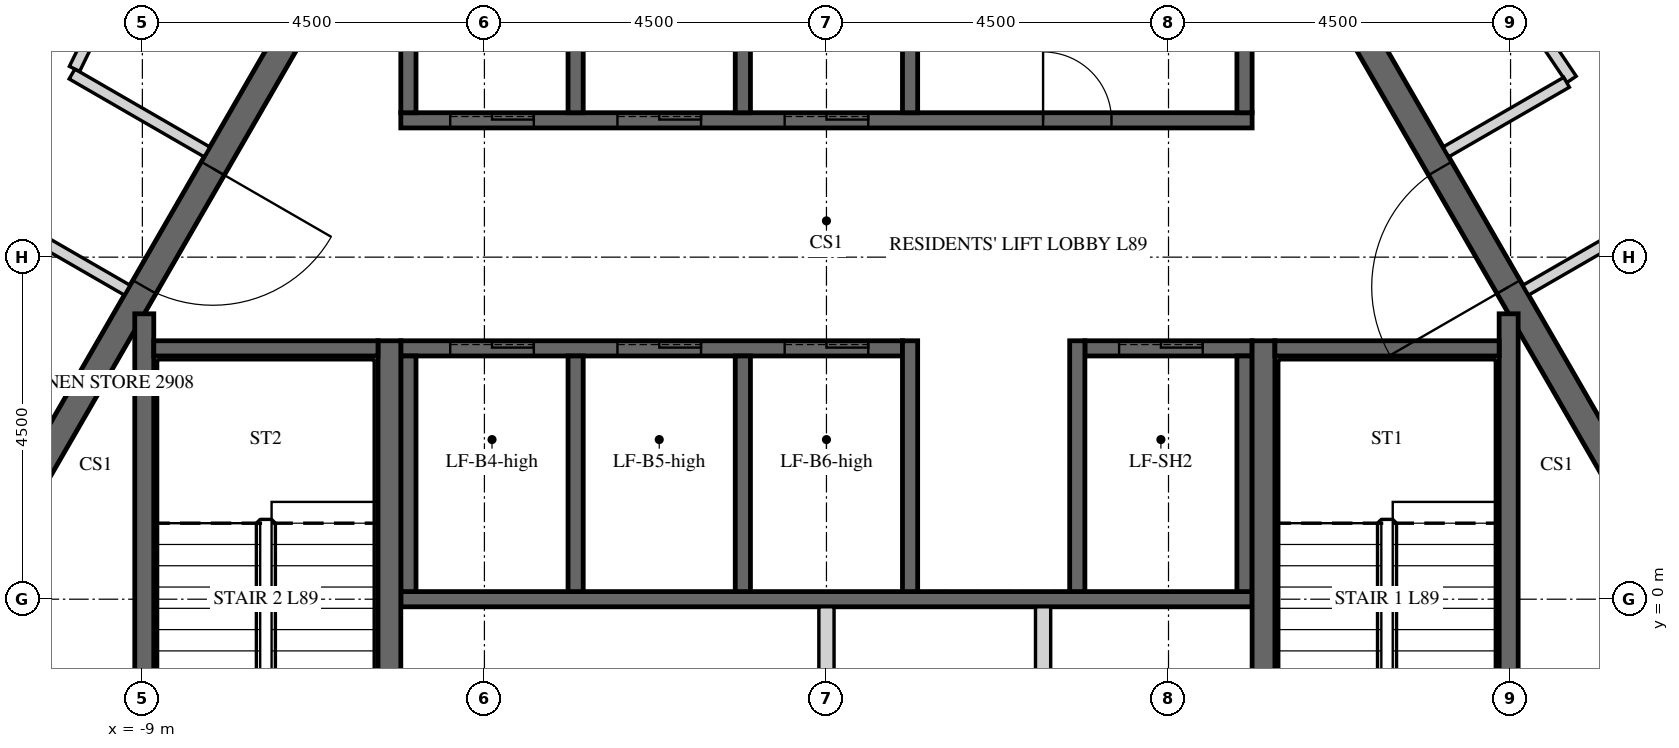
"""IFC4 building model, lengths in metres.
Left out: names, types, materials, properties, quantities, classifications, styles, units other than length and angle.
Written with IfcOpenShell. Run it as: python <this file> out.ifc"""

import sys

from ifc_helpers import new_model, si_unit, direction, frame, frame_2d, origin, place, context, subcontext, project, spatial, polyline, rectangle, outline, extrude, element, fill, save


model = new_model("IFC4")
c1 = context("Model", 3, precision=1e-05, world=origin(), true_north=direction((0.0, 1.0)))
c2 = subcontext(c1, "Body", "Model", "MODEL_VIEW")
j1 = project(units=[si_unit("LENGTHUNIT", "METRE"), si_unit("PLANEANGLEUNIT", "RADIAN")], contexts=[c1])
p1 = place(None, origin())
s1 = spatial("IfcSite", under=j1, at=p1, CompositionType="ELEMENT")
p2 = place(p1, origin())
s2 = spatial("IfcBuilding", under=s1, at=p2, CompositionType="ELEMENT")
p3 = place(p2, frame((0.0, 0.0, 369.0)))
s3 = spatial("IfcBuildingStorey", under=s2, at=p3, CompositionType="ELEMENT", Elevation=369.0)
p4 = place(p3, frame((-5.673, 9.825, -0.15), z_axis=(0.0, 0.0, 1.0), x_axis=(-0.499995046907, -0.866028263435, 0.0)))
e1 = element("IfcWall", 1, at=p4, inside=s3, PredefinedType="SHEAR", context=c2, shape_type="SweptSolid", body=[
    extrude(outline(polyline([(-0.101, -0.175), (11.446, -0.175), (11.244, 0.175), (0.101, 0.175), (-0.101, -0.175)])), origin(), (0.0, 0.0, 1.0), 3.9),
])
p5 = place(p4, frame((4.801, 0.0, 0.15)))
e2 = element("IfcOpeningElement", 2, at=p5, cuts=e1, PredefinedType="OPENING", context=c2, shape_type="SweptSolid", body=[
    extrude(rectangle(XDim=1.8, YDim=2.4, at=frame_2d((0.9, 1.2))), frame((0.0, 0.185, 0.0), z_axis=(0.0, -1.0, 0.0), x_axis=(1.0, 0.0, 0.0)), (0.0, 0.0, 1.0), 0.37),
])
p6 = place(p3, frame((-11.345, 0.0, -0.15), z_axis=(0.0, 0.0, 1.0), x_axis=(0.499995046907, -0.866028263435, 0.0)))
e3 = element("IfcWall", 3, at=p6, inside=s3, PredefinedType="SHEAR", context=c2, shape_type="SweptSolid", body=[
    extrude(outline(polyline([(-0.101, -0.175), (11.446, -0.175), (11.244, 0.175), (0.101, 0.175), (-0.101, -0.175)])), origin(), (0.0, 0.0, 1.0), 3.9),
])
p7 = place(p6, frame((4.744, 0.0, 0.15)))
e4 = element("IfcOpeningElement", 4, at=p7, cuts=e3, PredefinedType="OPENING", context=c2, shape_type="SweptSolid", body=[
    extrude(rectangle(XDim=1.8, YDim=2.4, at=frame_2d((0.9, 1.2))), frame((0.0, 0.185, 0.0), z_axis=(0.0, -1.0, 0.0), x_axis=(1.0, 0.0, 0.0)), (0.0, 0.0, 1.0), 0.37),
])
p8 = place(p3, frame((5.673, -9.825, -0.15), z_axis=(0.0, 0.0, 1.0), x_axis=(0.499995046907, 0.866028263435, 0.0)))
e5 = element("IfcWall", 5, at=p8, inside=s3, PredefinedType="SHEAR", context=c2, shape_type="SweptSolid", body=[
    extrude(outline(polyline([(-0.101, -0.175), (11.446, -0.175), (11.244, 0.175), (0.101, 0.175), (-0.101, -0.175)])), origin(), (0.0, 0.0, 1.0), 3.9),
])
p9 = place(p8, frame((4.801, 0.0, 0.15)))
e6 = element("IfcOpeningElement", 6, at=p9, cuts=e5, PredefinedType="OPENING", context=c2, shape_type="SweptSolid", body=[
    extrude(rectangle(XDim=1.8, YDim=2.4, at=frame_2d((0.9, 1.2))), frame((0.0, 0.185, 0.0), z_axis=(0.0, -1.0, 0.0), x_axis=(1.0, 0.0, 0.0)), (0.0, 0.0, 1.0), 0.37),
])
p10 = place(p3, frame((11.345, 0.0, -0.15), z_axis=(0.0, 0.0, 1.0), x_axis=(-0.499995046907, 0.866028263435, 0.0)))
e7 = element("IfcWall", 7, at=p10, inside=s3, PredefinedType="SHEAR", context=c2, shape_type="SweptSolid", body=[
    extrude(outline(polyline([(-0.101, -0.175), (11.446, -0.175), (11.244, 0.175), (0.101, 0.175), (-0.101, -0.175)])), origin(), (0.0, 0.0, 1.0), 3.9),
])
p11 = place(p10, frame((4.744, 0.0, 0.15)))
e8 = element("IfcOpeningElement", 8, at=p11, cuts=e7, PredefinedType="OPENING", context=c2, shape_type="SweptSolid", body=[
    extrude(rectangle(XDim=1.8, YDim=2.4, at=frame_2d((0.9, 1.2))), frame((0.0, 0.185, 0.0), z_axis=(0.0, -1.0, 0.0), x_axis=(1.0, 0.0, 0.0)), (0.0, 0.0, 1.0), 0.37),
])
p12 = place(p3, frame((-5.6, 6.3, -0.25), z_axis=(0.0, 0.0, 1.0), x_axis=(1.0, 0.0, 0.0)))
e9 = element("IfcWall", 9, at=p12, inside=s3, PredefinedType="SHEAR", context=c2, shape_type="SweptSolid", body=[
    extrude(rectangle(XDim=11.2, YDim=0.2, at=frame_2d((5.6, 0.0))), origin(), (0.0, 0.0, 1.0), 3.9),
])
p13 = place(p12, frame((8.45, 0.0, 0.25)))
e10 = element("IfcOpeningElement", 10, at=p13, cuts=e9, PredefinedType="OPENING", context=c2, shape_type="SweptSolid", body=[
    extrude(rectangle(XDim=0.9, YDim=2.1, at=frame_2d((0.45, 1.05))), frame((0.0, 0.11, 0.0), z_axis=(0.0, -1.0, 0.0), x_axis=(1.0, 0.0, 0.0)), (0.0, 0.0, 1.0), 0.22),
])
p14 = place(p12, frame((0.65, 0.0, 0.25)))
e11 = element("IfcOpeningElement", 11, at=p14, cuts=e9, PredefinedType="OPENING", context=c2, shape_type="SweptSolid", body=[
    extrude(rectangle(XDim=1.1, YDim=2.1, at=frame_2d((0.55, 1.05))), frame((0.0, 0.11, 0.0), z_axis=(0.0, -1.0, 0.0), x_axis=(1.0, 0.0, 0.0)), (0.0, 0.0, 1.0), 0.22),
])
p15 = place(p12, frame((2.85, 0.0, 0.25)))
e12 = element("IfcOpeningElement", 12, at=p15, cuts=e9, PredefinedType="OPENING", context=c2, shape_type="SweptSolid", body=[
    extrude(rectangle(XDim=1.1, YDim=2.1, at=frame_2d((0.55, 1.05))), frame((0.0, 0.11, 0.0), z_axis=(0.0, -1.0, 0.0), x_axis=(1.0, 0.0, 0.0)), (0.0, 0.0, 1.0), 0.22),
])
p16 = place(p12, frame((5.05, 0.0, 0.25)))
e13 = element("IfcOpeningElement", 13, at=p16, cuts=e9, PredefinedType="OPENING", context=c2, shape_type="SweptSolid", body=[
    extrude(rectangle(XDim=1.1, YDim=2.1, at=frame_2d((0.55, 1.05))), frame((0.0, 0.11, 0.0), z_axis=(0.0, -1.0, 0.0), x_axis=(1.0, 0.0, 0.0)), (0.0, 0.0, 1.0), 0.22),
])
for number, where, z_axis, x_axis in (
    (14, (-5.5, 6.4, -0.25), (0.0, 0.0, 1.0), (0.0, 1.0, 0.0)),
    (15, (-3.3, 6.4, -0.25), (0.0, 0.0, 1.0), (0.0, 1.0, 0.0)),
    (16, (-1.1, 6.4, -0.25), (0.0, 0.0, 1.0), (0.0, 1.0, 0.0)),
    (17, (1.1, 6.4, -0.25), (0.0, 0.0, 1.0), (0.0, 1.0, 0.0)),
    (18, (5.5, 6.4, -0.25), (0.0, 0.0, 1.0), (0.0, 1.0, 0.0)),
):
    element("IfcWall", number, at=place(p3, frame(where, z_axis=z_axis, x_axis=x_axis)), inside=s3, PredefinedType="SHEAR", context=c2, shape_type="SweptSolid", body=[
        extrude(rectangle(XDim=2.9, YDim=0.2, at=frame_2d((1.45, 0.0))), origin(), (0.0, 0.0, 1.0), 3.9),
    ])
p17 = place(p3, frame((-5.6, 3.3, -0.25), z_axis=(0.0, 0.0, 1.0), x_axis=(1.0, 0.0, 0.0)))
e19 = element("IfcWall", 19, at=p17, inside=s3, PredefinedType="SHEAR", context=c2, shape_type="SweptSolid", body=[
    extrude(rectangle(XDim=6.6, YDim=0.2, at=frame_2d((3.3, 0.0))), origin(), (0.0, 0.0, 1.0), 3.9),
])
p18 = place(p17, frame((0.65, 0.0, 0.25)))
e20 = element("IfcOpeningElement", 20, at=p18, cuts=e19, PredefinedType="OPENING", context=c2, shape_type="SweptSolid", body=[
    extrude(rectangle(XDim=1.1, YDim=2.1, at=frame_2d((0.55, 1.05))), frame((0.0, 0.11, 0.0), z_axis=(0.0, -1.0, 0.0), x_axis=(1.0, 0.0, 0.0)), (0.0, 0.0, 1.0), 0.22),
])
p19 = place(p17, frame((2.85, 0.0, 0.25)))
e21 = element("IfcOpeningElement", 21, at=p19, cuts=e19, PredefinedType="OPENING", context=c2, shape_type="SweptSolid", body=[
    extrude(rectangle(XDim=1.1, YDim=2.1, at=frame_2d((0.55, 1.05))), frame((0.0, 0.11, 0.0), z_axis=(0.0, -1.0, 0.0), x_axis=(1.0, 0.0, 0.0)), (0.0, 0.0, 1.0), 0.22),
])
p20 = place(p17, frame((5.05, 0.0, 0.25)))
e22 = element("IfcOpeningElement", 22, at=p20, cuts=e19, PredefinedType="OPENING", context=c2, shape_type="SweptSolid", body=[
    extrude(rectangle(XDim=1.1, YDim=2.1, at=frame_2d((0.55, 1.05))), frame((0.0, 0.11, 0.0), z_axis=(0.0, -1.0, 0.0), x_axis=(1.0, 0.0, 0.0)), (0.0, 0.0, 1.0), 0.22),
])
p21 = place(p3, frame((3.4, 3.3, -0.25), z_axis=(0.0, 0.0, 1.0), x_axis=(1.0, 0.0, 0.0)))
e23 = element("IfcWall", 23, at=p21, inside=s3, PredefinedType="SHEAR", context=c2, shape_type="SweptSolid", body=[
    extrude(rectangle(XDim=2.2, YDim=0.2, at=frame_2d((1.1, 0.0))), origin(), (0.0, 0.0, 1.0), 3.9),
])
p22 = place(p21, frame((0.45, 0.0, 0.25)))
e24 = element("IfcOpeningElement", 24, at=p22, cuts=e23, PredefinedType="OPENING", context=c2, shape_type="SweptSolid", body=[
    extrude(rectangle(XDim=1.1, YDim=2.1, at=frame_2d((0.55, 1.05))), frame((0.0, 0.11, 0.0), z_axis=(0.0, -1.0, 0.0), x_axis=(1.0, 0.0, 0.0)), (0.0, 0.0, 1.0), 0.22),
])
p23 = place(p3, frame((-5.6, 0.0, -0.25), z_axis=(0.0, 0.0, 1.0), x_axis=(1.0, 0.0, 0.0)))
e25 = element("IfcWall", 25, at=p23, inside=s3, PredefinedType="SHEAR", context=c2, shape_type="SweptSolid", body=[
    extrude(rectangle(XDim=11.2, YDim=0.2, at=frame_2d((5.6, 0.0))), origin(), (0.0, 0.0, 1.0), 3.9),
])
for number, where, z_axis, x_axis in (
    (26, (-5.5, 0.1, -0.25), (0.0, 0.0, 1.0), (0.0, 1.0, 0.0)),
    (27, (-3.3, 0.1, -0.25), (0.0, 0.0, 1.0), (0.0, 1.0, 0.0)),
    (28, (-1.1, 0.1, -0.25), (0.0, 0.0, 1.0), (0.0, 1.0, 0.0)),
):
    element("IfcWall", number, at=place(p3, frame(where, z_axis=z_axis, x_axis=x_axis)), inside=s3, PredefinedType="SHEAR", context=c2, shape_type="SweptSolid", body=[
        extrude(rectangle(XDim=3.1, YDim=0.2, at=frame_2d((1.55, 0.0))), origin(), (0.0, 0.0, 1.0), 3.9),
    ])
for number, where, z_axis, x_axis in (
    (29, (1.1, 0.1, -0.25), (0.0, 0.0, 1.0), (0.0, 1.0, 0.0)),
    (30, (3.3, 0.1, -0.25), (0.0, 0.0, 1.0), (0.0, 1.0, 0.0)),
):
    element("IfcWall", number, at=place(p3, frame(where, z_axis=z_axis, x_axis=x_axis)), inside=s3, PredefinedType="SHEAR", context=c2, shape_type="SweptSolid", body=[
        extrude(rectangle(XDim=3.3, YDim=0.2, at=frame_2d((1.65, 0.0))), origin(), (0.0, 0.0, 1.0), 3.9),
    ])
p24 = place(p3, frame((5.5, 0.1, -0.25), z_axis=(0.0, 0.0, 1.0), x_axis=(0.0, 1.0, 0.0)))
e31 = element("IfcWall", 31, at=p24, inside=s3, PredefinedType="SHEAR", context=c2, shape_type="SweptSolid", body=[
    extrude(rectangle(XDim=3.1, YDim=0.2, at=frame_2d((1.55, 0.0))), origin(), (0.0, 0.0, 1.0), 3.9),
])
p25 = place(p3, frame((2.85, -3.2, 0.0), z_axis=(0.0, 0.0, 1.0), x_axis=(0.0, 1.0, 0.0)))
e32 = element("IfcWall", 32, at=p25, inside=s3, PredefinedType="PARTITIONING", context=c2, shape_type="SweptSolid", body=[
    extrude(rectangle(XDim=3.1, YDim=0.2, at=frame_2d((1.55, 0.0))), origin(), (0.0, 0.0, 1.0), 3.65),
])
p26 = place(p3, frame((0.0, -6.2, 0.0), z_axis=(0.0, 0.0, 1.0), x_axis=(0.0, 1.0, 0.0)))
e33 = element("IfcWall", 33, at=p26, inside=s3, PredefinedType="PARTITIONING", context=c2, shape_type="SweptSolid", body=[
    extrude(rectangle(XDim=6.1, YDim=0.2, at=frame_2d((3.05, 0.0))), origin(), (0.0, 0.0, 1.0), 3.65),
])
p27 = place(p3, frame((5.75, -3.4, -0.25), z_axis=(0.0, 0.0, 1.0), x_axis=(0.0, 1.0, 0.0)))
e34 = element("IfcWall", 34, at=p27, inside=s3, PredefinedType="SHEAR", context=c2, shape_type="SweptSolid", body=[
    extrude(rectangle(XDim=6.8, YDim=0.3, at=frame_2d((3.4, 0.0))), origin(), (0.0, 0.0, 1.0), 3.9),
])
p28 = place(p3, frame((8.975, -3.755, -0.25), z_axis=(0.0, 0.0, 1.0), x_axis=(0.0, 1.0, 0.0)))
e35 = element("IfcWall", 35, at=p28, inside=s3, PredefinedType="SHEAR", context=c2, shape_type="SweptSolid", body=[
    extrude(rectangle(XDim=7.51, YDim=0.25, at=frame_2d((3.755, 0.0))), origin(), (0.0, 0.0, 1.0), 3.9),
])
p29 = place(p3, frame((5.9, 3.3, -0.25), z_axis=(0.0, 0.0, 1.0), x_axis=(1.0, 0.0, 0.0)))
e36 = element("IfcWall", 36, at=p29, inside=s3, PredefinedType="SHEAR", context=c2, shape_type="SweptSolid", body=[
    extrude(rectangle(XDim=2.95, YDim=0.2, at=frame_2d((1.475, 0.0))), origin(), (0.0, 0.0, 1.0), 3.9),
])
p30 = place(p3, frame((-5.75, -3.4, -0.25), z_axis=(0.0, 0.0, 1.0), x_axis=(0.0, 1.0, 0.0)))
e37 = element("IfcWall", 37, at=p30, inside=s3, PredefinedType="SHEAR", context=c2, shape_type="SweptSolid", body=[
    extrude(rectangle(XDim=6.8, YDim=0.3, at=frame_2d((3.4, 0.0))), origin(), (0.0, 0.0, 1.0), 3.9),
])
p31 = place(p3, frame((-8.975, -3.755, -0.25), z_axis=(0.0, 0.0, 1.0), x_axis=(0.0, 1.0, 0.0)))
e38 = element("IfcWall", 38, at=p31, inside=s3, PredefinedType="SHEAR", context=c2, shape_type="SweptSolid", body=[
    extrude(rectangle(XDim=7.51, YDim=0.25, at=frame_2d((3.755, 0.0))), origin(), (0.0, 0.0, 1.0), 3.9),
])
p32 = place(p3, frame((-8.85, 3.3, -0.25), z_axis=(0.0, 0.0, 1.0), x_axis=(1.0, 0.0, 0.0)))
e39 = element("IfcWall", 39, at=p32, inside=s3, PredefinedType="SHEAR", context=c2, shape_type="SweptSolid", body=[
    extrude(rectangle(XDim=2.95, YDim=0.2, at=frame_2d((1.475, 0.0))), origin(), (0.0, 0.0, 1.0), 3.9),
])
p33 = place(p3, frame((-7.653, 15.675, 0.0), z_axis=(0.0, 0.0, 1.0), x_axis=(-0.438369669055, -0.898794767037, 0.0)))
e40 = element("IfcWall", 40, at=p33, inside=s3, PredefinedType="PARTITIONING", context=c2, shape_type="SweptSolid", body=[
    extrude(rectangle(XDim=15.243, YDim=0.15, at=frame_2d((7.621, 0.0))), origin(), (0.0, 0.0, 1.0), 2.47),
])
p34 = place(p33, frame((2.942, 0.0, 0.0)))
e41 = element("IfcOpeningElement", 41, at=p34, cuts=e40, PredefinedType="OPENING", context=c2, shape_type="SweptSolid", body=[
    extrude(rectangle(XDim=1.0, YDim=2.1, at=frame_2d((0.5, 1.05))), frame((0.0, 0.085, 0.0), z_axis=(0.0, -1.0, 0.0), x_axis=(1.0, 0.0, 0.0)), (0.0, 0.0, 1.0), 0.17),
])
p35 = place(p3, frame((-8.15, 5.884, 0.0), z_axis=(0.0, 0.0, 1.0), x_axis=(-0.866007146345, 0.50003162148, 0.0)))
e42 = element("IfcWall", 42, at=p35, inside=s3, PredefinedType="PARTITIONING", context=c2, shape_type="SweptSolid", body=[
    extrude(rectangle(XDim=2.051, YDim=0.15, at=frame_2d((1.025, 0.0))), origin(), (0.0, 0.0, 1.0), 2.47),
])
p36 = place(p3, frame((-9.893, 6.977, 0.0), z_axis=(0.0, 0.0, 1.0), x_axis=(0.438380229518, 0.898789616299, 0.0)))
e43 = element("IfcWall", 43, at=p36, inside=s3, PredefinedType="PARTITIONING", context=c2, shape_type="SweptSolid", body=[
    extrude(rectangle(XDim=7.758, YDim=0.15, at=frame_2d((3.879, 0.0))), origin(), (0.0, 0.0, 1.0), 2.47),
])
p37 = place(p3, frame((-10.783, 4.98, 0.0), z_axis=(0.0, 0.0, 1.0), x_axis=(0.866007702746, -0.500030657845, 0.0)))
e44 = element("IfcWall", 44, at=p37, inside=s3, PredefinedType="PARTITIONING", context=c2, shape_type="SweptSolid", body=[
    extrude(rectangle(XDim=1.829, YDim=0.15, at=frame_2d((0.914, 0.0))), origin(), (0.0, 0.0, 1.0), 2.47),
])
p38 = place(p3, frame((17.401, -1.21, 0.0), z_axis=(0.0, 0.0, 1.0), x_axis=(-0.559186729505, 0.829041736914, 0.0)))
e45 = element("IfcWall", 45, at=p38, inside=s3, PredefinedType="PARTITIONING", context=c2, shape_type="SweptSolid", body=[
    extrude(rectangle(XDim=15.243, YDim=0.15, at=frame_2d((7.621, 0.0))), origin(), (0.0, 0.0, 1.0), 2.47),
])
p39 = place(p38, frame((5.802, 0.0, 0.0)))
e46 = element("IfcOpeningElement", 46, at=p39, cuts=e45, PredefinedType="OPENING", context=c2, shape_type="SweptSolid", body=[
    extrude(rectangle(XDim=1.0, YDim=2.1, at=frame_2d((0.5, 1.05))), frame((0.0, 0.085, 0.0), z_axis=(0.0, -1.0, 0.0), x_axis=(1.0, 0.0, 0.0)), (0.0, 0.0, 1.0), 0.17),
])
p40 = place(p3, frame((9.2, 4.066, 0.0), z_axis=(0.0, 0.0, 1.0), x_axis=(0.866011447264, 0.500024172624, 0.0)))
e47 = element("IfcWall", 47, at=p40, inside=s3, PredefinedType="PARTITIONING", context=c2, shape_type="SweptSolid", body=[
    extrude(rectangle(XDim=2.055, YDim=0.15, at=frame_2d((1.027, 0.0))), origin(), (0.0, 0.0, 1.0), 2.47),
])
p41 = place(p3, frame((6.999, 10.994, 0.0), z_axis=(0.0, 0.0, 1.0), x_axis=(0.55918759866, -0.82904115067, 0.0)))
e48 = element("IfcWall", 48, at=p41, inside=s3, PredefinedType="PARTITIONING", context=c2, shape_type="SweptSolid", body=[
    extrude(rectangle(XDim=5.013, YDim=0.15, at=frame_2d((2.506, 0.0))), origin(), (0.0, 0.0, 1.0), 2.47),
])
p42 = place(p41, frame((2.057, 0.0, 0.0)))
e49 = element("IfcOpeningElement", 49, at=p42, cuts=e48, PredefinedType="OPENING", context=c2, shape_type="SweptSolid", body=[
    extrude(rectangle(XDim=0.9, YDim=2.1, at=frame_2d((0.45, 1.05))), frame((0.0, 0.085, 0.0), z_axis=(0.0, -1.0, 0.0), x_axis=(1.0, 0.0, 0.0)), (0.0, 0.0, 1.0), 0.17),
])
p43 = place(p3, frame((9.737, 6.801, 0.0), z_axis=(0.0, 0.0, 1.0), x_axis=(-0.866045829247, -0.499964620392, 0.0)))
e50 = element("IfcWall", 50, at=p43, inside=s3, PredefinedType="PARTITIONING", context=c2, shape_type="SweptSolid", body=[
    extrude(rectangle(XDim=1.833, YDim=0.15, at=frame_2d((0.917, 0.0))), origin(), (0.0, 0.0, 1.0), 2.47),
])
p44 = place(p5, origin())
e51 = element("IfcDoor", 51, at=p44, inside=s3, OperationType="DOUBLE_DOOR_SINGLE_SWING", PredefinedType="DOOR", context=c2, shape_type="SweptSolid", body=[
    extrude(rectangle(XDim=1.8, YDim=2.4, at=frame_2d((0.9, 1.2))), frame((0.0, 0.025, 0.0), z_axis=(0.0, -1.0, 0.0), x_axis=(1.0, 0.0, 0.0)), (0.0, 0.0, 1.0), 0.05),
])
fill(e2, e51)
p45 = place(p11, origin())
e52 = element("IfcDoor", 52, at=p45, inside=s3, OperationType="DOUBLE_DOOR_SINGLE_SWING", PredefinedType="DOOR", context=c2, shape_type="SweptSolid", body=[
    extrude(rectangle(XDim=1.8, YDim=2.4, at=frame_2d((0.9, 1.2))), frame((0.0, 0.025, 0.0), z_axis=(0.0, -1.0, 0.0), x_axis=(1.0, 0.0, 0.0)), (0.0, 0.0, 1.0), 0.05),
])
fill(e8, e52)
p46 = place(p13, origin())
e53 = element("IfcDoor", 53, at=p46, inside=s3, OperationType="SINGLE_SWING_LEFT", PredefinedType="DOOR", context=c2, shape_type="SweptSolid", body=[
    extrude(rectangle(XDim=0.9, YDim=2.1, at=frame_2d((0.45, 1.05))), frame((0.0, 0.025, 0.0), z_axis=(0.0, -1.0, 0.0), x_axis=(1.0, 0.0, 0.0)), (0.0, 0.0, 1.0), 0.05),
])
fill(e10, e53)
p47 = place(p14, origin())
e54 = element("IfcDoor", 54, at=p47, inside=s3, OperationType="SLIDING_TO_LEFT", PredefinedType="DOOR", context=c2, shape_type="SweptSolid", body=[
    extrude(rectangle(XDim=1.1, YDim=2.1, at=frame_2d((0.55, 1.05))), frame((0.0, 0.025, 0.0), z_axis=(0.0, -1.0, 0.0), x_axis=(1.0, 0.0, 0.0)), (0.0, 0.0, 1.0), 0.05),
])
fill(e11, e54)
p48 = place(p15, origin())
e55 = element("IfcDoor", 55, at=p48, inside=s3, OperationType="SLIDING_TO_LEFT", PredefinedType="DOOR", context=c2, shape_type="SweptSolid", body=[
    extrude(rectangle(XDim=1.1, YDim=2.1, at=frame_2d((0.55, 1.05))), frame((0.0, 0.025, 0.0), z_axis=(0.0, -1.0, 0.0), x_axis=(1.0, 0.0, 0.0)), (0.0, 0.0, 1.0), 0.05),
])
fill(e12, e55)
p49 = place(p16, origin())
e56 = element("IfcDoor", 56, at=p49, inside=s3, OperationType="SLIDING_TO_LEFT", PredefinedType="DOOR", context=c2, shape_type="SweptSolid", body=[
    extrude(rectangle(XDim=1.1, YDim=2.1, at=frame_2d((0.55, 1.05))), frame((0.0, 0.025, 0.0), z_axis=(0.0, -1.0, 0.0), x_axis=(1.0, 0.0, 0.0)), (0.0, 0.0, 1.0), 0.05),
])
fill(e13, e56)
p50 = place(p18, origin())
e57 = element("IfcDoor", 57, at=p50, inside=s3, OperationType="SLIDING_TO_LEFT", PredefinedType="DOOR", context=c2, shape_type="SweptSolid", body=[
    extrude(rectangle(XDim=1.1, YDim=2.1, at=frame_2d((0.55, 1.05))), frame((0.0, 0.025, 0.0), z_axis=(0.0, -1.0, 0.0), x_axis=(1.0, 0.0, 0.0)), (0.0, 0.0, 1.0), 0.05),
])
fill(e20, e57)
p51 = place(p19, origin())
e58 = element("IfcDoor", 58, at=p51, inside=s3, OperationType="SLIDING_TO_LEFT", PredefinedType="DOOR", context=c2, shape_type="SweptSolid", body=[
    extrude(rectangle(XDim=1.1, YDim=2.1, at=frame_2d((0.55, 1.05))), frame((0.0, 0.025, 0.0), z_axis=(0.0, -1.0, 0.0), x_axis=(1.0, 0.0, 0.0)), (0.0, 0.0, 1.0), 0.05),
])
fill(e21, e58)
p52 = place(p20, origin())
e59 = element("IfcDoor", 59, at=p52, inside=s3, OperationType="SLIDING_TO_LEFT", PredefinedType="DOOR", context=c2, shape_type="SweptSolid", body=[
    extrude(rectangle(XDim=1.1, YDim=2.1, at=frame_2d((0.55, 1.05))), frame((0.0, 0.025, 0.0), z_axis=(0.0, -1.0, 0.0), x_axis=(1.0, 0.0, 0.0)), (0.0, 0.0, 1.0), 0.05),
])
fill(e22, e59)
p53 = place(p22, origin())
e60 = element("IfcDoor", 60, at=p53, inside=s3, OperationType="SLIDING_TO_LEFT", PredefinedType="DOOR", context=c2, shape_type="SweptSolid", body=[
    extrude(rectangle(XDim=1.1, YDim=2.1, at=frame_2d((0.55, 1.05))), frame((0.0, 0.025, 0.0), z_axis=(0.0, -1.0, 0.0), x_axis=(1.0, 0.0, 0.0)), (0.0, 0.0, 1.0), 0.05),
])
fill(e24, e60)
save(model, sys.argv[1])
